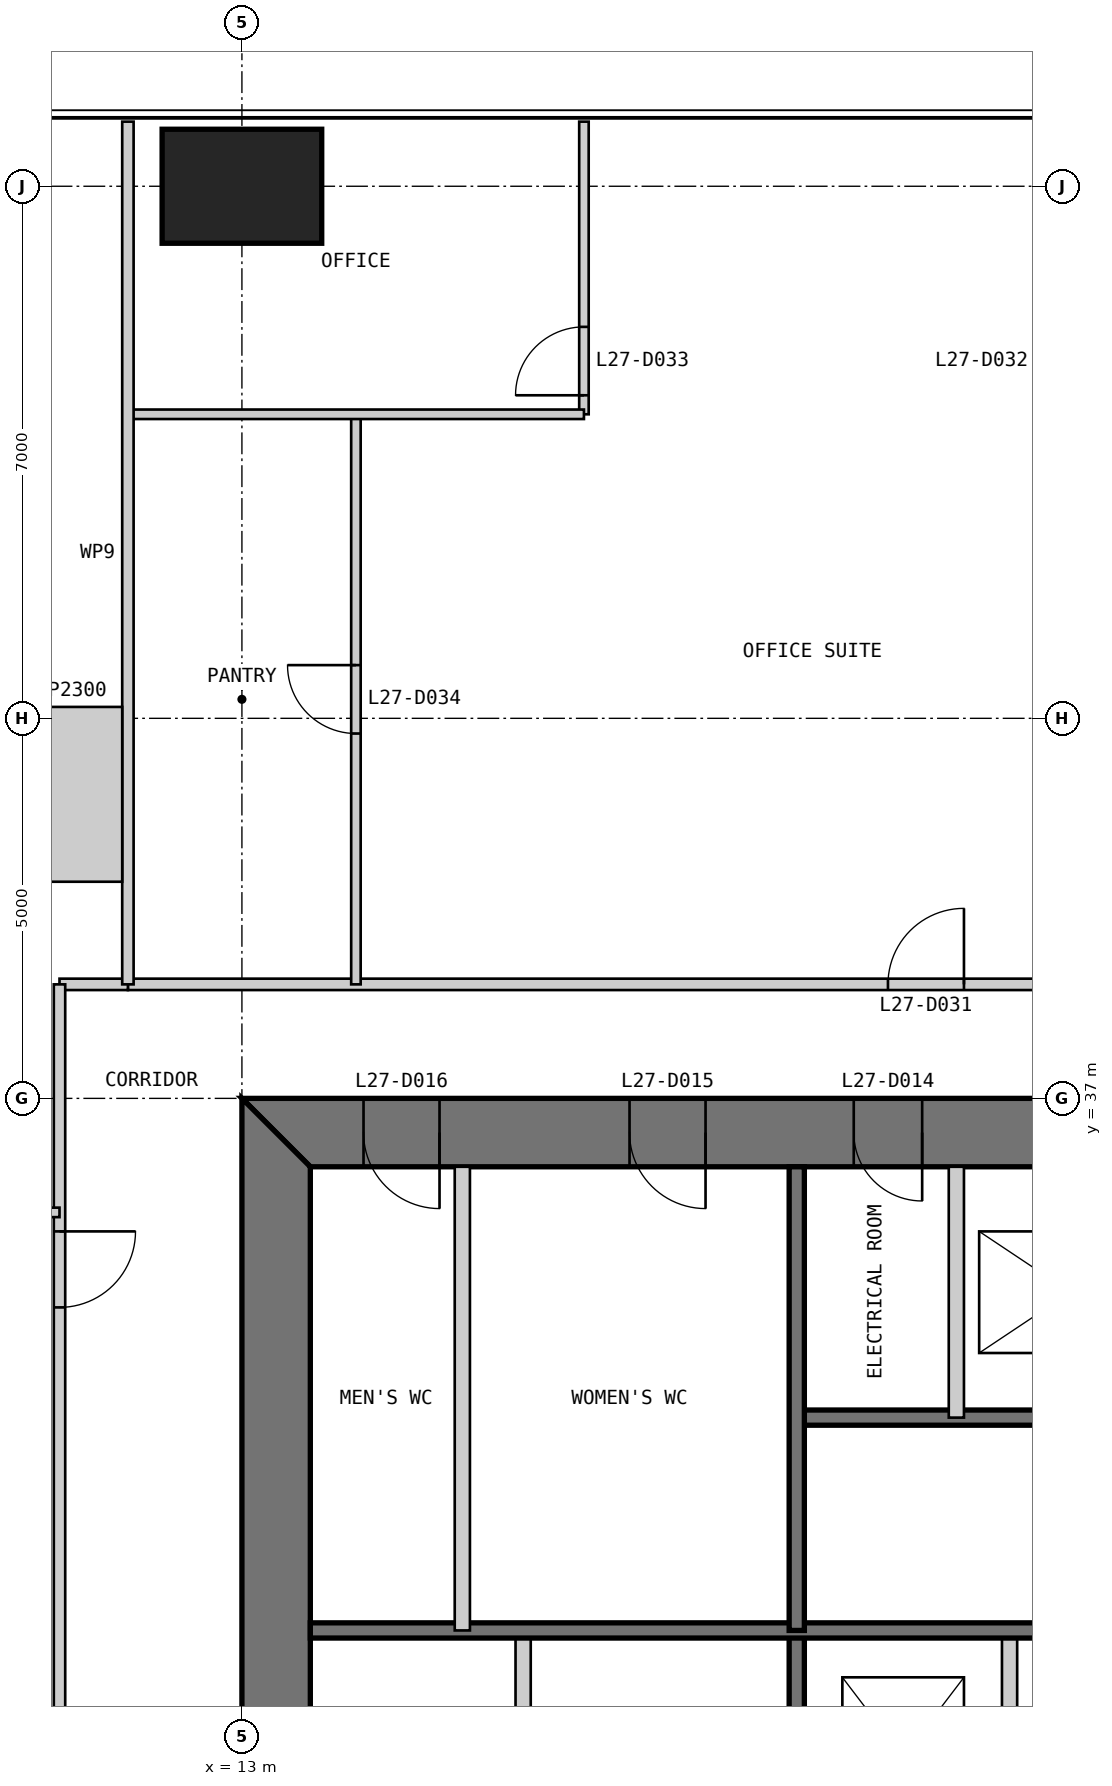
"""IFC4 building model, lengths in metres.
Left out: names, types, materials, properties, quantities, classifications, styles, units other than length and angle.
Written with IfcOpenShell. Run it as: python <this file> out.ifc"""

import sys

from ifc_helpers import new_model, si_unit, direction, frame, frame_2d, origin, origin_2d, place, context, subcontext, project, spatial, polyline, rectangle, outline, extrude, element, fill, save


model = new_model("IFC4")
c1 = context("Model", 3, precision=1e-05, world=origin(), true_north=direction((0.0, 1.0)))
c2 = subcontext(c1, "Body", "Model", "MODEL_VIEW")
j1 = project(units=[si_unit("LENGTHUNIT", "METRE"), si_unit("PLANEANGLEUNIT", "RADIAN")], contexts=[c1])
p1 = place(None, origin())
s1 = spatial("IfcSite", under=j1, at=p1, CompositionType="ELEMENT")
p2 = place(p1, origin())
s2 = spatial("IfcBuilding", under=s1, at=p2, CompositionType="ELEMENT")
p3 = place(p2, frame((0.0, 0.0, 118.4)))
s3 = spatial("IfcBuildingStorey", under=s2, at=p3, CompositionType="ELEMENT", Elevation=118.4)
p4 = place(p3, frame((13.0, 49.0, 0.0), z_axis=(0.0, 0.0, 1.0), x_axis=(1.0, 0.0, 0.0)))
e1 = element("IfcColumn", 1, at=p4, inside=s3, PredefinedType="COLUMN", context=c2, shape_type="SweptSolid", body=[
    extrude(rectangle(XDim=2.1, YDim=1.5, at=origin_2d()), origin(), (0.0, 0.0, 1.0), 4.0),
])
p5 = place(p3, frame((37.0, 36.55, 0.0), z_axis=(0.0, 0.0, 1.0), x_axis=(-1.0, 0.0, 0.0)))
e2 = element("IfcWall", 2, at=p5, inside=s3, PredefinedType="SHEAR", context=c2, shape_type="SweptSolid", body=[
    extrude(outline(polyline([(0.0, -0.45), (24.0, -0.45), (23.1, 0.45), (0.9, 0.45), (0.0, -0.45)])), origin(), (0.0, 0.0, 1.0), 4.0),
])
p6 = place(p5, frame((4.9, 0.0, 0.0)))
e3 = element("IfcOpeningElement", 3, at=p6, cuts=e2, PredefinedType="OPENING", context=c2, shape_type="SweptSolid", body=[
    extrude(rectangle(XDim=1.0, YDim=2.2, at=frame_2d((0.5, 1.1))), frame((0.0, 0.46, 0.0), z_axis=(0.0, -1.0, 0.0), x_axis=(1.0, 0.0, 0.0)), (0.0, 0.0, 1.0), 0.92),
])
p7 = place(p5, frame((8.9, 0.0, 0.0)))
e4 = element("IfcOpeningElement", 4, at=p7, cuts=e2, PredefinedType="OPENING", context=c2, shape_type="SweptSolid", body=[
    extrude(rectangle(XDim=1.1, YDim=2.2, at=frame_2d((0.55, 1.1))), frame((0.0, 0.46, 0.0), z_axis=(0.0, -1.0, 0.0), x_axis=(1.0, 0.0, 0.0)), (0.0, 0.0, 1.0), 0.92),
])
p8 = place(p5, frame((15.05, 0.0, 0.0)))
e5 = element("IfcOpeningElement", 5, at=p8, cuts=e2, PredefinedType="OPENING", context=c2, shape_type="SweptSolid", body=[
    extrude(rectangle(XDim=0.9, YDim=2.2, at=frame_2d((0.45, 1.1))), frame((0.0, 0.46, 0.0), z_axis=(0.0, -1.0, 0.0), x_axis=(1.0, 0.0, 0.0)), (0.0, 0.0, 1.0), 0.92),
])
p9 = place(p5, frame((17.9, 0.0, 0.0)))
e6 = element("IfcOpeningElement", 6, at=p9, cuts=e2, PredefinedType="OPENING", context=c2, shape_type="SweptSolid", body=[
    extrude(rectangle(XDim=1.0, YDim=2.2, at=frame_2d((0.5, 1.1))), frame((0.0, 0.46, 0.0), z_axis=(0.0, -1.0, 0.0), x_axis=(1.0, 0.0, 0.0)), (0.0, 0.0, 1.0), 0.92),
])
p10 = place(p5, frame((21.4, 0.0, 0.0)))
e7 = element("IfcOpeningElement", 7, at=p10, cuts=e2, PredefinedType="OPENING", context=c2, shape_type="SweptSolid", body=[
    extrude(rectangle(XDim=1.0, YDim=2.2, at=frame_2d((0.5, 1.1))), frame((0.0, 0.46, 0.0), z_axis=(0.0, -1.0, 0.0), x_axis=(1.0, 0.0, 0.0)), (0.0, 0.0, 1.0), 0.92),
])
p11 = place(p3, frame((13.45, 36.1, 0.0), z_axis=(0.0, 0.0, 1.0), x_axis=(0.0, -1.0, 0.0)))
e8 = element("IfcWall", 8, at=p11, inside=s3, PredefinedType="SHEAR", context=c2, shape_type="SweptSolid", body=[
    extrude(outline(polyline([(-0.9, -0.45), (23.1, -0.45), (22.2, 0.45), (0.0, 0.45), (-0.9, -0.45)])), origin(), (0.0, 0.0, 1.0), 4.0),
])
p12 = place(p11, frame((20.2, 0.0, 0.0)))
e9 = element("IfcOpeningElement", 9, at=p12, cuts=e8, PredefinedType="OPENING", context=c2, shape_type="SweptSolid", body=[
    extrude(rectangle(XDim=1.0, YDim=2.2, at=frame_2d((0.5, 1.1))), frame((0.0, 0.46, 0.0), z_axis=(0.0, -1.0, 0.0), x_axis=(1.0, 0.0, 0.0)), (0.0, 0.0, 1.0), 0.92),
])
p13 = place(p11, frame((17.25, 0.0, 0.0)))
e10 = element("IfcOpeningElement", 10, at=p13, cuts=e8, PredefinedType="OPENING", context=c2, shape_type="SweptSolid", body=[
    extrude(rectangle(XDim=0.9, YDim=2.2, at=frame_2d((0.45, 1.1))), frame((0.0, 0.46, 0.0), z_axis=(0.0, -1.0, 0.0), x_axis=(1.0, 0.0, 0.0)), (0.0, 0.0, 1.0), 0.92),
])
p14 = place(p3, frame((16.7, 13.9, 0.0), z_axis=(0.0, 0.0, 1.0), x_axis=(0.0, 1.0, 0.0)))
e11 = element("IfcWall", 11, at=p14, inside=s3, PredefinedType="PARTITIONING", context=c2, shape_type="SweptSolid", body=[
    extrude(rectangle(XDim=16.1, YDim=0.2, at=frame_2d((8.05, 0.0))), origin(), (0.0, 0.0, 1.0), 3.8),
])
p15 = place(p14, frame((9.65, 0.0, 0.0)))
e12 = element("IfcOpeningElement", 12, at=p15, cuts=e11, PredefinedType="OPENING", context=c2, shape_type="SweptSolid", body=[
    extrude(rectangle(XDim=0.9, YDim=2.2, at=frame_2d((0.45, 1.1))), frame((0.0, 0.11, 0.0), z_axis=(0.0, -1.0, 0.0), x_axis=(1.0, 0.0, 0.0)), (0.0, 0.0, 1.0), 0.22),
])
p16 = place(p14, frame((13.65, 0.0, 0.0)))
e13 = element("IfcOpeningElement", 13, at=p16, cuts=e11, PredefinedType="OPENING", context=c2, shape_type="SweptSolid", body=[
    extrude(rectangle(XDim=0.9, YDim=2.2, at=frame_2d((0.45, 1.1))), frame((0.0, 0.11, 0.0), z_axis=(0.0, -1.0, 0.0), x_axis=(1.0, 0.0, 0.0)), (0.0, 0.0, 1.0), 0.22),
])
p17 = place(p3, frame((20.3, 13.9, 0.0), z_axis=(0.0, 0.0, 1.0), x_axis=(0.0, 1.0, 0.0)))
e14 = element("IfcWall", 14, at=p17, inside=s3, PredefinedType="SOLIDWALL", context=c2, shape_type="SweptSolid", body=[
    extrude(rectangle(XDim=16.1, YDim=0.2, at=frame_2d((8.05, 0.0))), origin(), (0.0, 0.0, 1.0), 3.8),
])
p18 = place(p17, frame((7.217, 0.0, 0.0)))
e15 = element("IfcOpeningElement", 15, at=p18, cuts=e14, PredefinedType="OPENING", context=c2, shape_type="SweptSolid", body=[
    extrude(rectangle(XDim=1.1, YDim=2.2, at=frame_2d((0.55, 1.1))), frame((0.0, 0.11, 0.0), z_axis=(0.0, -1.0, 0.0), x_axis=(1.0, 0.0, 0.0)), (0.0, 0.0, 1.0), 0.22),
])
p19 = place(p17, frame((10.55, 0.0, 0.0)))
e16 = element("IfcOpeningElement", 16, at=p19, cuts=e14, PredefinedType="OPENING", context=c2, shape_type="SweptSolid", body=[
    extrude(rectangle(XDim=1.1, YDim=2.2, at=frame_2d((0.55, 1.1))), frame((0.0, 0.11, 0.0), z_axis=(0.0, -1.0, 0.0), x_axis=(1.0, 0.0, 0.0)), (0.0, 0.0, 1.0), 0.22),
])
p20 = place(p17, frame((13.883, 0.0, 0.0)))
e17 = element("IfcOpeningElement", 17, at=p20, cuts=e14, PredefinedType="OPENING", context=c2, shape_type="SweptSolid", body=[
    extrude(rectangle(XDim=1.1, YDim=2.2, at=frame_2d((0.55, 1.1))), frame((0.0, 0.11, 0.0), z_axis=(0.0, -1.0, 0.0), x_axis=(1.0, 0.0, 0.0)), (0.0, 0.0, 1.0), 0.22),
])
p21 = place(p3, frame((23.1, 20.0, 0.0), z_axis=(0.0, 0.0, 1.0), x_axis=(0.0, 1.0, 0.0)))
e18 = element("IfcWall", 18, at=p21, inside=s3, PredefinedType="PARTITIONING", context=c2, shape_type="SweptSolid", body=[
    extrude(rectangle(XDim=10.0, YDim=0.2, at=frame_2d((5.0, 0.0))), origin(), (0.0, 0.0, 1.0), 3.8),
])
p22 = place(p3, frame((29.7, 32.8, 0.0), z_axis=(0.0, 0.0, 1.0), x_axis=(-1.0, 0.0, 0.0)))
e19 = element("IfcWall", 19, at=p22, inside=s3, PredefinedType="SOLIDWALL", context=c2, shape_type="SweptSolid", body=[
    extrude(rectangle(XDim=9.4, YDim=0.2, at=frame_2d((4.7, 0.0))), origin(), (0.0, 0.0, 1.0), 3.8),
])
p23 = place(p22, frame((0.25, 0.0, 0.0)))
e20 = element("IfcOpeningElement", 20, at=p23, cuts=e19, PredefinedType="OPENING", context=c2, shape_type="SweptSolid", body=[
    extrude(rectangle(XDim=1.0, YDim=2.2, at=frame_2d((0.5, 1.1))), frame((0.0, 0.11, 0.0), z_axis=(0.0, -1.0, 0.0), x_axis=(1.0, 0.0, 0.0)), (0.0, 0.0, 1.0), 0.22),
])
p24 = place(p3, frame((29.7, 30.0, 0.0), z_axis=(0.0, 0.0, 1.0), x_axis=(-1.0, 0.0, 0.0)))
e21 = element("IfcWall", 21, at=p24, inside=s3, PredefinedType="SOLIDWALL", context=c2, shape_type="SweptSolid", body=[
    extrude(rectangle(XDim=15.8, YDim=0.2, at=frame_2d((7.9, 0.0))), origin(), (0.0, 0.0, 1.0), 3.8),
])
p25 = place(p3, frame((22.4, 36.1, 0.0), z_axis=(0.0, 0.0, 1.0), x_axis=(0.0, -1.0, 0.0)))
e22 = element("IfcWall", 22, at=p25, inside=s3, PredefinedType="PARTITIONING", context=c2, shape_type="SweptSolid", body=[
    extrude(rectangle(XDim=3.3, YDim=0.2, at=frame_2d((1.65, 0.0))), origin(), (0.0, 0.0, 1.0), 3.8),
])
p26 = place(p3, frame((20.3, 36.1, 0.0), z_axis=(0.0, 0.0, 1.0), x_axis=(0.0, -1.0, 0.0)))
e23 = element("IfcWall", 23, at=p26, inside=s3, PredefinedType="SOLIDWALL", context=c2, shape_type="SweptSolid", body=[
    extrude(rectangle(XDim=6.1, YDim=0.2, at=frame_2d((3.05, 0.0))), origin(), (0.0, 0.0, 1.0), 3.8),
])
p27 = place(p3, frame((15.9, 36.1, 0.0), z_axis=(0.0, 0.0, 1.0), x_axis=(0.0, -1.0, 0.0)))
e24 = element("IfcWall", 24, at=p27, inside=s3, PredefinedType="PARTITIONING", context=c2, shape_type="SweptSolid", body=[
    extrude(rectangle(XDim=6.1, YDim=0.2, at=frame_2d((3.05, 0.0))), origin(), (0.0, 0.0, 1.0), 3.8),
])
p28 = place(p3, frame((38.5, 38.5, 0.0), z_axis=(0.0, 0.0, 1.0), x_axis=(-1.0, 0.0, 0.0)))
e25 = element("IfcWall", 25, at=p28, inside=s3, PredefinedType="PARTITIONING", context=c2, shape_type="SweptSolid", body=[
    extrude(rectangle(XDim=27.0, YDim=0.15, at=frame_2d((13.5, 0.0))), origin(), (0.0, 0.0, 1.0), 3.85),
])
p29 = place(p28, frame((2.5, 0.0, 0.0)))
e26 = element("IfcOpeningElement", 26, at=p29, cuts=e25, PredefinedType="OPENING", context=c2, shape_type="SweptSolid", body=[
    extrude(rectangle(XDim=1.0, YDim=2.2, at=frame_2d((0.5, 1.1))), frame((0.0, 0.085, 0.0), z_axis=(0.0, -1.0, 0.0), x_axis=(1.0, 0.0, 0.0)), (0.0, 0.0, 1.0), 0.17),
])
p30 = place(p28, frame((16.0, 0.0, 0.0)))
e27 = element("IfcOpeningElement", 27, at=p30, cuts=e25, PredefinedType="OPENING", context=c2, shape_type="SweptSolid", body=[
    extrude(rectangle(XDim=1.0, YDim=2.2, at=frame_2d((0.5, 1.1))), frame((0.0, 0.085, 0.0), z_axis=(0.0, -1.0, 0.0), x_axis=(1.0, 0.0, 0.0)), (0.0, 0.0, 1.0), 0.17),
])
p31 = place(p3, frame((17.5, 49.85, 0.0), z_axis=(0.0, 0.0, 1.0), x_axis=(0.0, -1.0, 0.0)))
e28 = element("IfcWall", 28, at=p31, inside=s3, PredefinedType="PARTITIONING", context=c2, shape_type="SweptSolid", body=[
    extrude(rectangle(XDim=3.85, YDim=0.125, at=frame_2d((1.925, 0.0))), origin(), (0.0, 0.0, 1.0), 3.85),
])
p32 = place(p31, frame((2.7, 0.0, 0.0)))
e29 = element("IfcOpeningElement", 29, at=p32, cuts=e28, PredefinedType="OPENING", context=c2, shape_type="SweptSolid", body=[
    extrude(rectangle(XDim=0.9, YDim=2.2, at=frame_2d((0.45, 1.1))), frame((0.0, 0.073, 0.0), z_axis=(0.0, -1.0, 0.0), x_axis=(1.0, 0.0, 0.0)), (0.0, 0.0, 1.0), 0.145),
])
p33 = place(p3, frame((14.5, 46.0, 0.0), z_axis=(0.0, 0.0, 1.0), x_axis=(0.0, -1.0, 0.0)))
e30 = element("IfcWall", 30, at=p33, inside=s3, PredefinedType="PARTITIONING", context=c2, shape_type="SweptSolid", body=[
    extrude(rectangle(XDim=7.5, YDim=0.125, at=frame_2d((3.75, 0.0))), origin(), (0.0, 0.0, 1.0), 3.85),
])
p34 = place(p33, frame((3.3, 0.0, 0.0)))
e31 = element("IfcOpeningElement", 31, at=p34, cuts=e30, PredefinedType="OPENING", context=c2, shape_type="SweptSolid", body=[
    extrude(rectangle(XDim=0.9, YDim=2.2, at=frame_2d((0.45, 1.1))), frame((0.0, 0.073, 0.0), z_axis=(0.0, -1.0, 0.0), x_axis=(1.0, 0.0, 0.0)), (0.0, 0.0, 1.0), 0.145),
])
p35 = place(p3, frame((17.5, 46.0, 0.0), z_axis=(0.0, 0.0, 1.0), x_axis=(-1.0, 0.0, 0.0)))
e32 = element("IfcWall", 32, at=p35, inside=s3, PredefinedType="PARTITIONING", context=c2, shape_type="SweptSolid", body=[
    extrude(rectangle(XDim=6.0, YDim=0.125, at=frame_2d((3.0, 0.0))), origin(), (0.0, 0.0, 1.0), 3.85),
])
p36 = place(p3, frame((11.5, 38.5, 0.0), z_axis=(0.0, 0.0, 1.0), x_axis=(-1.0, 0.0, 0.0)))
e33 = element("IfcWall", 33, at=p36, inside=s3, PredefinedType="PARTITIONING", context=c2, shape_type="SweptSolid", body=[
    extrude(rectangle(XDim=0.9, YDim=0.15, at=frame_2d((0.45, 0.0))), origin(), (0.0, 0.0, 1.0), 3.85),
])
p37 = place(p3, frame((10.6, 38.5, 0.0), z_axis=(0.0, 0.0, 1.0), x_axis=(0.0, -1.0, 0.0)))
e34 = element("IfcWall", 34, at=p37, inside=s3, PredefinedType="PARTITIONING", context=c2, shape_type="SweptSolid", body=[
    extrude(rectangle(XDim=27.0, YDim=0.15, at=frame_2d((13.5, 0.0))), origin(), (0.0, 0.0, 1.0), 3.85),
])
p38 = place(p37, frame((3.25, 0.0, 0.0)))
e35 = element("IfcOpeningElement", 35, at=p38, cuts=e34, PredefinedType="OPENING", context=c2, shape_type="SweptSolid", body=[
    extrude(rectangle(XDim=1.0, YDim=2.2, at=frame_2d((0.5, 1.1))), frame((0.0, 0.085, 0.0), z_axis=(0.0, -1.0, 0.0), x_axis=(1.0, 0.0, 0.0)), (0.0, 0.0, 1.0), 0.17),
])
p39 = place(p37, frame((22.75, 0.0, 0.0)))
e36 = element("IfcOpeningElement", 36, at=p39, cuts=e34, PredefinedType="OPENING", context=c2, shape_type="SweptSolid", body=[
    extrude(rectangle(XDim=1.0, YDim=2.2, at=frame_2d((0.5, 1.1))), frame((0.0, 0.085, 0.0), z_axis=(0.0, -1.0, 0.0), x_axis=(1.0, 0.0, 0.0)), (0.0, 0.0, 1.0), 0.17),
])
p40 = place(p3, frame((11.5, 49.85, 0.0), z_axis=(0.0, 0.0, 1.0), x_axis=(0.0, -1.0, 0.0)))
e37 = element("IfcWall", 37, at=p40, inside=s3, PredefinedType="PARTITIONING", context=c2, shape_type="SweptSolid", body=[
    extrude(rectangle(XDim=11.35, YDim=0.15, at=frame_2d((5.675, 0.0))), origin(), (0.0, 0.0, 1.0), 3.85),
])
p41 = place(p3, frame((0.15, 35.5, 0.0), z_axis=(0.0, 0.0, 1.0), x_axis=(1.0, 0.0, 0.0)))
e38 = element("IfcWall", 38, at=p41, inside=s3, PredefinedType="PARTITIONING", context=c2, shape_type="SweptSolid", body=[
    extrude(rectangle(XDim=10.45, YDim=0.125, at=frame_2d((5.225, 0.0))), origin(), (0.0, 0.0, 1.0), 3.85),
])
p42 = place(p41, frame((6.65, 0.0, 0.0)))
e39 = element("IfcOpeningElement", 39, at=p42, cuts=e38, PredefinedType="OPENING", context=c2, shape_type="SweptSolid", body=[
    extrude(rectangle(XDim=1.0, YDim=2.2, at=frame_2d((0.5, 1.1))), frame((0.0, 0.073, 0.0), z_axis=(0.0, -1.0, 0.0), x_axis=(1.0, 0.0, 0.0)), (0.0, 0.0, 1.0), 0.145),
])
p43 = place(p3, frame((11.425, 41.0, 0.0), z_axis=(0.0, 0.0, 1.0), x_axis=(-1.0, 0.0, 0.0)))
e40 = element("IfcWall", 40, at=p43, inside=s3, PredefinedType="PARTITIONING", context=c2, shape_type="SweptSolid", body=[
    extrude(rectangle(XDim=1.325, YDim=2.3, at=frame_2d((0.663, 0.0))), origin(), (0.0, 0.0, 1.0), 3.85),
])
p44 = place(p8, origin())
e41 = element("IfcDoor", 41, at=p44, inside=s3, OperationType="SINGLE_SWING_LEFT", PredefinedType="DOOR", context=c2, shape_type="SweptSolid", body=[
    extrude(rectangle(XDim=0.9, YDim=2.2, at=frame_2d((0.45, 1.1))), frame((0.0, 0.025, 0.0), z_axis=(0.0, -1.0, 0.0), x_axis=(1.0, 0.0, 0.0)), (0.0, 0.0, 1.0), 0.05),
    extrude(outline(polyline([(0.0, 0.0), (0.04, 0.0), (0.04, 2.16), (0.86, 2.16), (0.86, 0.0), (0.9, 0.0), (0.9, 2.2), (0.0, 2.2), (0.0, 0.0)])), frame((0.0, 0.3, 0.0), z_axis=(0.0, -1.0, 0.0), x_axis=(1.0, 0.0, 0.0)), (0.0, 0.0, 1.0), 0.6),
])
fill(e5, e41)
p45 = place(p9, origin())
e42 = element("IfcDoor", 42, at=p45, inside=s3, OperationType="SINGLE_SWING_LEFT", PredefinedType="DOOR", context=c2, shape_type="SweptSolid", body=[
    extrude(rectangle(XDim=1.0, YDim=2.2, at=frame_2d((0.5, 1.1))), frame((0.0, 0.025, 0.0), z_axis=(0.0, -1.0, 0.0), x_axis=(1.0, 0.0, 0.0)), (0.0, 0.0, 1.0), 0.05),
    extrude(outline(polyline([(0.0, 0.0), (0.04, 0.0), (0.04, 2.16), (0.96, 2.16), (0.96, 0.0), (1.0, 0.0), (1.0, 2.2), (0.0, 2.2), (0.0, 0.0)])), frame((0.0, 0.3, 0.0), z_axis=(0.0, -1.0, 0.0), x_axis=(1.0, 0.0, 0.0)), (0.0, 0.0, 1.0), 0.6),
])
fill(e6, e42)
p46 = place(p10, origin())
e43 = element("IfcDoor", 43, at=p46, inside=s3, OperationType="SINGLE_SWING_LEFT", PredefinedType="DOOR", context=c2, shape_type="SweptSolid", body=[
    extrude(rectangle(XDim=1.0, YDim=2.2, at=frame_2d((0.5, 1.1))), frame((0.0, 0.025, 0.0), z_axis=(0.0, -1.0, 0.0), x_axis=(1.0, 0.0, 0.0)), (0.0, 0.0, 1.0), 0.05),
    extrude(outline(polyline([(0.0, 0.0), (0.04, 0.0), (0.04, 2.16), (0.96, 2.16), (0.96, 0.0), (1.0, 0.0), (1.0, 2.2), (0.0, 2.2), (0.0, 0.0)])), frame((0.0, 0.3, 0.0), z_axis=(0.0, -1.0, 0.0), x_axis=(1.0, 0.0, 0.0)), (0.0, 0.0, 1.0), 0.6),
])
fill(e7, e43)
p47 = place(p30, frame((1.0, 0.0, 0.0), z_axis=(0.0, 0.0, 1.0), x_axis=(-1.0, 0.0, 0.0)))
e44 = element("IfcDoor", 44, at=p47, inside=s3, OperationType="SINGLE_SWING_RIGHT", PredefinedType="DOOR", context=c2, shape_type="SweptSolid", body=[
    extrude(rectangle(XDim=1.0, YDim=2.2, at=frame_2d((0.5, 1.1))), frame((0.0, 0.025, 0.0), z_axis=(0.0, -1.0, 0.0), x_axis=(1.0, 0.0, 0.0)), (0.0, 0.0, 1.0), 0.05),
])
fill(e27, e44)
p48 = place(p32, frame((0.9, 0.0, 0.0), z_axis=(0.0, 0.0, 1.0), x_axis=(-1.0, 0.0, 0.0)))
e45 = element("IfcDoor", 45, at=p48, inside=s3, OperationType="SINGLE_SWING_LEFT", PredefinedType="DOOR", context=c2, shape_type="SweptSolid", body=[
    extrude(rectangle(XDim=0.9, YDim=2.2, at=frame_2d((0.45, 1.1))), frame((0.0, 0.025, 0.0), z_axis=(0.0, -1.0, 0.0), x_axis=(1.0, 0.0, 0.0)), (0.0, 0.0, 1.0), 0.05),
])
fill(e29, e45)
p49 = place(p34, frame((0.9, 0.0, 0.0), z_axis=(0.0, 0.0, 1.0), x_axis=(-1.0, 0.0, 0.0)))
e46 = element("IfcDoor", 46, at=p49, inside=s3, OperationType="SINGLE_SWING_RIGHT", PredefinedType="DOOR", context=c2, shape_type="SweptSolid", body=[
    extrude(rectangle(XDim=0.9, YDim=2.2, at=frame_2d((0.45, 1.1))), frame((0.0, 0.025, 0.0), z_axis=(0.0, -1.0, 0.0), x_axis=(1.0, 0.0, 0.0)), (0.0, 0.0, 1.0), 0.05),
])
fill(e31, e46)
p50 = place(p38, origin())
e47 = element("IfcDoor", 47, at=p50, inside=s3, OperationType="SINGLE_SWING_LEFT", PredefinedType="DOOR", context=c2, shape_type="SweptSolid", body=[
    extrude(rectangle(XDim=1.0, YDim=2.2, at=frame_2d((0.5, 1.1))), frame((0.0, 0.025, 0.0), z_axis=(0.0, -1.0, 0.0), x_axis=(1.0, 0.0, 0.0)), (0.0, 0.0, 1.0), 0.05),
])
fill(e35, e47)
save(model, sys.argv[1])
